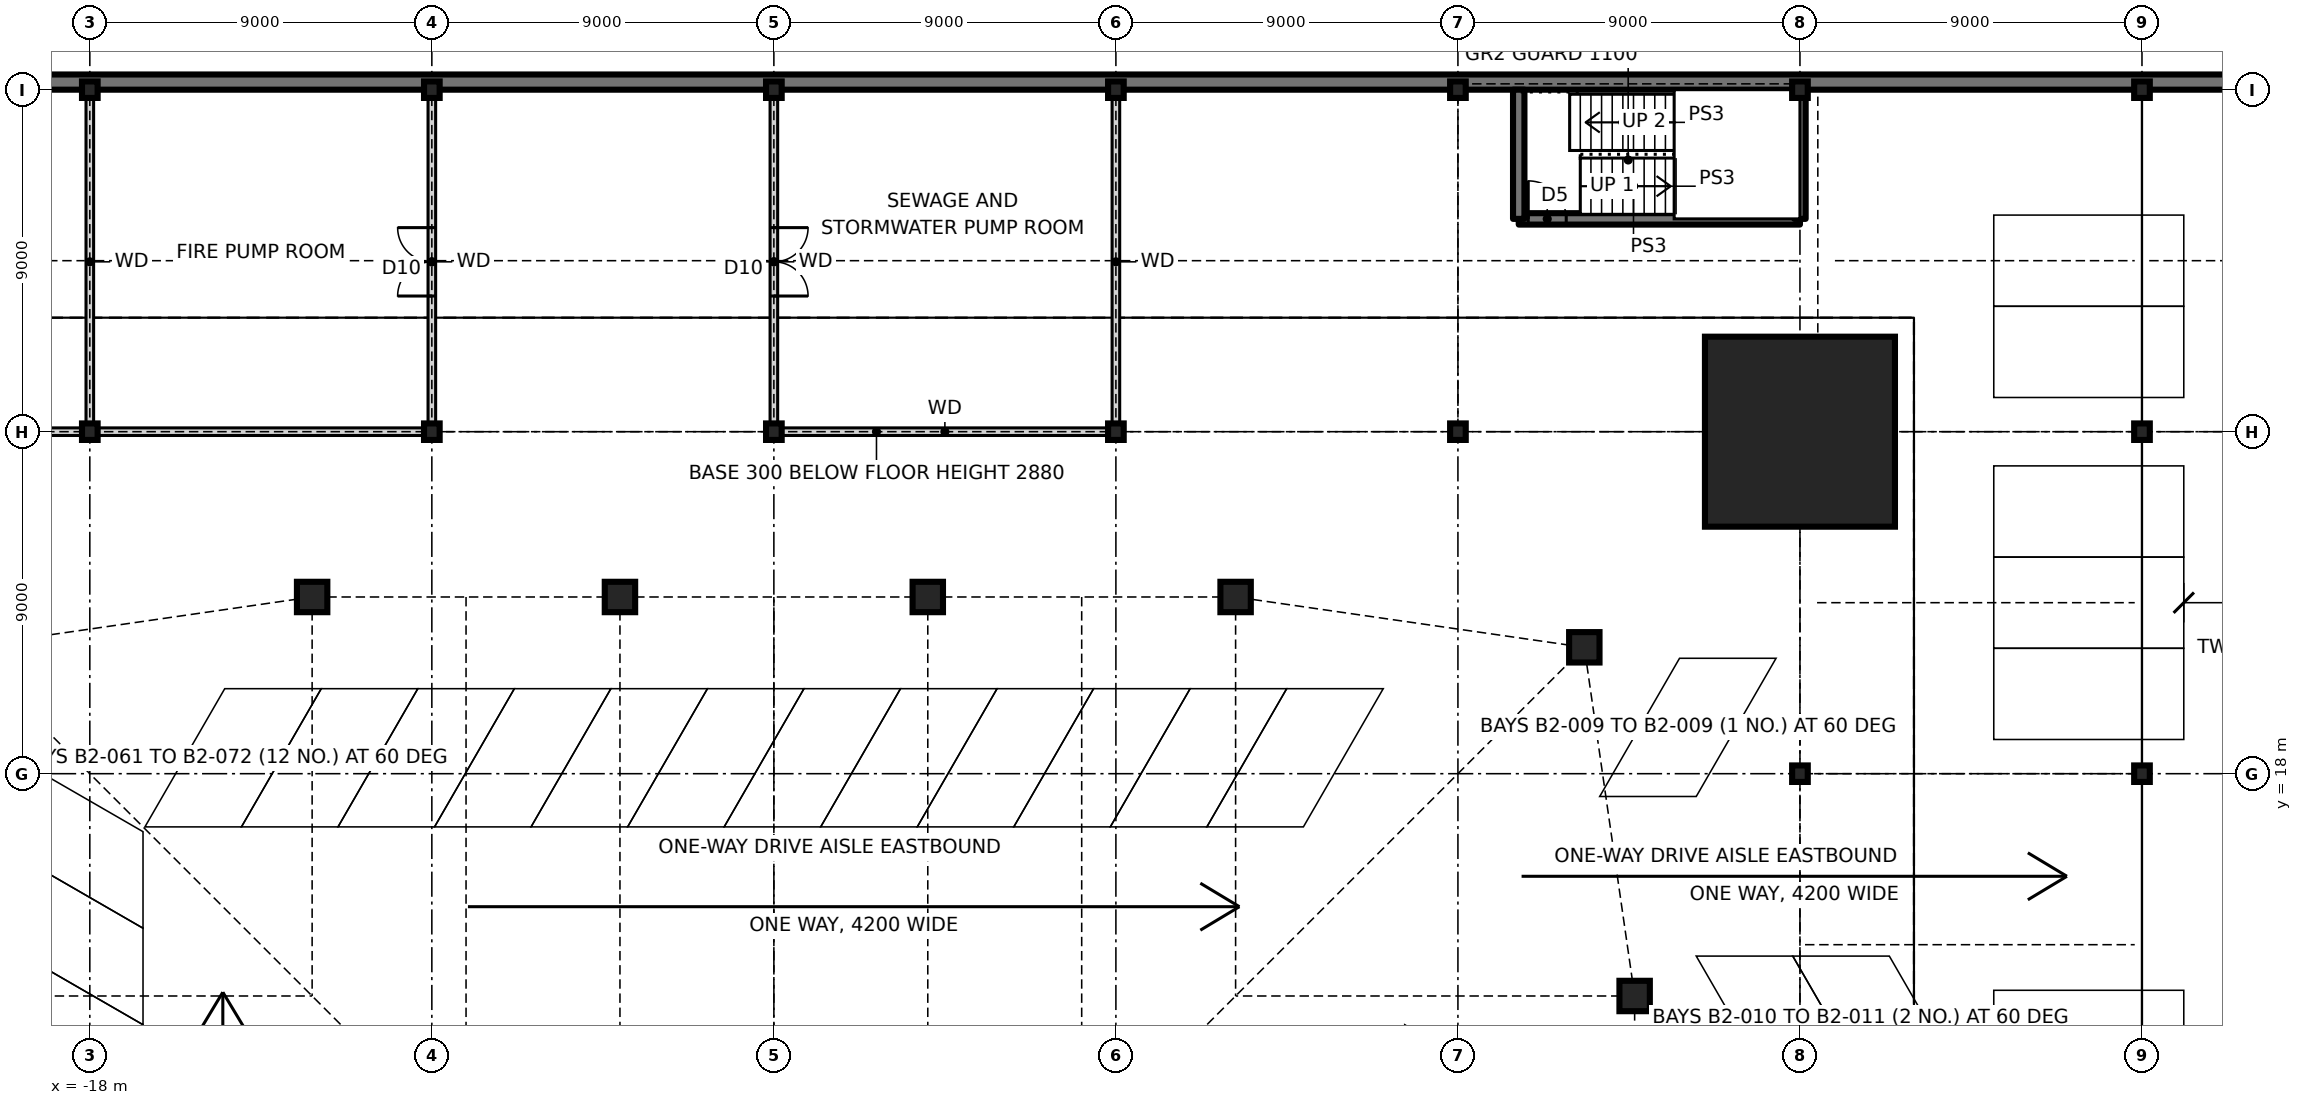
"""IFC4 building model, lengths in metres.
Left out: names, types, materials, properties, quantities, classifications, styles, units other than length and angle.
Written with IfcOpenShell. Run it as: python <this file> out.ifc"""

import sys

from ifc_helpers import new_model, si_unit, direction, frame, frame_2d, origin, origin_2d, place, context, subcontext, project, spatial, rectangle, hollow_rectangle, i_section, extrude, element, fill, save


model = new_model("IFC4")
c1 = context("Model", 3, precision=1e-05, world=origin(), true_north=direction((0.0, 1.0)))
c2 = subcontext(c1, "Body", "Model", "MODEL_VIEW")
j1 = project(units=[si_unit("LENGTHUNIT", "METRE"), si_unit("PLANEANGLEUNIT", "RADIAN")], contexts=[c1])
p1 = place(None, origin())
s1 = spatial("IfcSite", under=j1, at=p1, CompositionType="ELEMENT")
p2 = place(p1, origin())
s2 = spatial("IfcBuilding", under=s1, at=p2, CompositionType="ELEMENT")
p3 = place(p2, frame((0.0, 0.0, -7.2)))
s3 = spatial("IfcBuildingStorey", under=s2, at=p3, CompositionType="ELEMENT", Elevation=-7.2)
for number, where, z_axis, x_axis in (
    (1, (22.65, 12.15, -1.8), (0.0, 0.0, 1.0), (1.0, 0.0, 0.0)),
    (2, (21.326, 21.326, -1.8), (0.0, 0.0, 1.0), (1.0, 0.0, 0.0)),
    (3, (12.15, 22.65, -1.8), (0.0, 0.0, 1.0), (1.0, 0.0, 0.0)),
    (4, (4.05, 22.65, -1.8), (0.0, 0.0, 1.0), (1.0, 0.0, 0.0)),
    (5, (-4.05, 22.65, -1.8), (0.0, 0.0, 1.0), (1.0, 0.0, 0.0)),
    (6, (-12.15, 22.65, -1.8), (0.0, 0.0, 1.0), (1.0, 0.0, 0.0)),
):
    element("IfcColumn", number, at=place(p3, frame(where, z_axis=z_axis, x_axis=x_axis)), inside=s3, PredefinedType="COLUMN", context=c2, shape_type="SweptSolid", body=[
        extrude(hollow_rectangle(XDim=0.8, YDim=0.8, WallThickness=0.09, at=origin_2d()), origin(), (0.0, 0.0, 1.0), 5.4),
    ])
p4 = place(p3, frame((27.0, 27.0, -1.8), z_axis=(0.0, 0.0, 1.0), x_axis=(1.0, 0.0, 0.0)))
e7 = element("IfcColumn", 7, at=p4, inside=s3, PredefinedType="COLUMN", context=c2, shape_type="SweptSolid", body=[
    extrude(rectangle(XDim=5.0, YDim=5.0, at=origin_2d()), origin(), (0.0, 0.0, 1.0), 5.4),
    extrude(i_section(OverallWidth=0.478, OverallDepth=0.599, WebThickness=0.1, FlangeThickness=0.14, at=origin_2d()), origin(), (0.0, 0.0, 1.0), 5.4),
])
p5 = place(p3, frame((-18.0, 27.0, -1.8), z_axis=(0.0, 0.0, 1.0), x_axis=(1.0, 0.0, 0.0)))
e8 = element("IfcColumn", 8, at=p5, inside=s3, PredefinedType="COLUMN", context=c2, shape_type="SweptSolid", body=[
    extrude(i_section(OverallWidth=0.411, OverallDepth=0.434, WebThickness=0.036, FlangeThickness=0.057, at=origin_2d()), origin(), (0.0, 0.0, 1.0), 5.4),
])
p6 = place(p3, frame((-18.0, 36.0, -0.25), z_axis=(0.0, 0.0, 1.0), x_axis=(1.0, 0.0, 0.0)))
e9 = element("IfcColumn", 9, at=p6, inside=s3, PredefinedType="COLUMN", context=c2, shape_type="SweptSolid", body=[
    extrude(i_section(OverallWidth=0.411, OverallDepth=0.434, WebThickness=0.036, FlangeThickness=0.057, at=origin_2d()), origin(), (0.0, 0.0, 1.0), 3.85),
])
p7 = place(p3, frame((-9.0, 27.0, -1.8), z_axis=(0.0, 0.0, 1.0), x_axis=(1.0, 0.0, 0.0)))
e10 = element("IfcColumn", 10, at=p7, inside=s3, PredefinedType="COLUMN", context=c2, shape_type="SweptSolid", body=[
    extrude(i_section(OverallWidth=0.411, OverallDepth=0.434, WebThickness=0.036, FlangeThickness=0.057, at=origin_2d()), origin(), (0.0, 0.0, 1.0), 5.4),
])
p8 = place(p3, frame((-9.0, 36.0, -0.25), z_axis=(0.0, 0.0, 1.0), x_axis=(1.0, 0.0, 0.0)))
e11 = element("IfcColumn", 11, at=p8, inside=s3, PredefinedType="COLUMN", context=c2, shape_type="SweptSolid", body=[
    extrude(i_section(OverallWidth=0.411, OverallDepth=0.434, WebThickness=0.036, FlangeThickness=0.057, at=origin_2d()), origin(), (0.0, 0.0, 1.0), 3.85),
])
p9 = place(p3, frame((0.0, 27.0, -1.8), z_axis=(0.0, 0.0, 1.0), x_axis=(1.0, 0.0, 0.0)))
e12 = element("IfcColumn", 12, at=p9, inside=s3, PredefinedType="COLUMN", context=c2, shape_type="SweptSolid", body=[
    extrude(i_section(OverallWidth=0.411, OverallDepth=0.434, WebThickness=0.036, FlangeThickness=0.057, at=origin_2d()), origin(), (0.0, 0.0, 1.0), 5.4),
])
p10 = place(p3, frame((0.0, 36.0, -0.25), z_axis=(0.0, 0.0, 1.0), x_axis=(1.0, 0.0, 0.0)))
e13 = element("IfcColumn", 13, at=p10, inside=s3, PredefinedType="COLUMN", context=c2, shape_type="SweptSolid", body=[
    extrude(i_section(OverallWidth=0.411, OverallDepth=0.434, WebThickness=0.036, FlangeThickness=0.057, at=origin_2d()), origin(), (0.0, 0.0, 1.0), 3.85),
])
p11 = place(p3, frame((9.0, 27.0, -1.8), z_axis=(0.0, 0.0, 1.0), x_axis=(1.0, 0.0, 0.0)))
e14 = element("IfcColumn", 14, at=p11, inside=s3, PredefinedType="COLUMN", context=c2, shape_type="SweptSolid", body=[
    extrude(i_section(OverallWidth=0.411, OverallDepth=0.434, WebThickness=0.036, FlangeThickness=0.057, at=origin_2d()), origin(), (0.0, 0.0, 1.0), 5.4),
])
p12 = place(p3, frame((9.0, 36.0, -0.25), z_axis=(0.0, 0.0, 1.0), x_axis=(1.0, 0.0, 0.0)))
e15 = element("IfcColumn", 15, at=p12, inside=s3, PredefinedType="COLUMN", context=c2, shape_type="SweptSolid", body=[
    extrude(i_section(OverallWidth=0.411, OverallDepth=0.434, WebThickness=0.036, FlangeThickness=0.057, at=origin_2d()), origin(), (0.0, 0.0, 1.0), 3.85),
])
p13 = place(p3, frame((18.0, 27.0, -1.8), z_axis=(0.0, 0.0, 1.0), x_axis=(1.0, 0.0, 0.0)))
e16 = element("IfcColumn", 16, at=p13, inside=s3, PredefinedType="COLUMN", context=c2, shape_type="SweptSolid", body=[
    extrude(i_section(OverallWidth=0.411, OverallDepth=0.434, WebThickness=0.036, FlangeThickness=0.057, at=origin_2d()), origin(), (0.0, 0.0, 1.0), 5.4),
])
p14 = place(p3, frame((18.0, 36.0, -0.25), z_axis=(0.0, 0.0, 1.0), x_axis=(1.0, 0.0, 0.0)))
e17 = element("IfcColumn", 17, at=p14, inside=s3, PredefinedType="COLUMN", context=c2, shape_type="SweptSolid", body=[
    extrude(i_section(OverallWidth=0.411, OverallDepth=0.434, WebThickness=0.036, FlangeThickness=0.057, at=origin_2d()), origin(), (0.0, 0.0, 1.0), 3.85),
])
p15 = place(p3, frame((27.0, 18.0, -1.8), z_axis=(0.0, 0.0, 1.0), x_axis=(1.0, 0.0, 0.0)))
e18 = element("IfcColumn", 18, at=p15, inside=s3, PredefinedType="COLUMN", context=c2, shape_type="SweptSolid", body=[
    extrude(i_section(OverallWidth=0.411, OverallDepth=0.434, WebThickness=0.036, FlangeThickness=0.057, at=origin_2d()), origin(), (0.0, 0.0, 1.0), 5.4),
])
for number, where, z_axis, x_axis in (
    (19, (27.0, 36.0, -0.25), (0.0, 0.0, 1.0), (1.0, 0.0, 0.0)),
    (20, (36.0, 18.0, -0.25), (0.0, 0.0, 1.0), (1.0, 0.0, 0.0)),
    (21, (36.0, 27.0, -0.25), (0.0, 0.0, 1.0), (1.0, 0.0, 0.0)),
    (22, (36.0, 36.0, -0.25), (0.0, 0.0, 1.0), (1.0, 0.0, 0.0)),
):
    element("IfcColumn", number, at=place(p3, frame(where, z_axis=z_axis, x_axis=x_axis)), inside=s3, PredefinedType="COLUMN", context=c2, shape_type="SweptSolid", body=[
        extrude(i_section(OverallWidth=0.411, OverallDepth=0.434, WebThickness=0.036, FlangeThickness=0.057, at=origin_2d()), origin(), (0.0, 0.0, 1.0), 3.85),
    ])
p16 = place(p3, frame((30.0, 29.775, -1.8), z_axis=(0.0, 0.0, 1.0), x_axis=(-1.0, 0.0, 0.0)))
e23 = element("IfcWall", 23, at=p16, inside=s3, PredefinedType="SOLIDWALL", context=c2, shape_type="SweptSolid", body=[
    extrude(rectangle(XDim=60.0, YDim=0.45, at=frame_2d((30.0, 0.0))), origin(), (0.0, 0.0, 1.0), 1.5),
])
for number, where, z_axis, x_axis in (
    (24, (29.775, -29.55, -1.8), (0.0, 0.0, 1.0), (0.0, 1.0, 0.0)),
    (25, (-29.55, 18.0, -1.8), (0.0, 0.0, 1.0), (1.0, 0.0, 0.0)),
):
    element("IfcWall", number, at=place(p3, frame(where, z_axis=z_axis, x_axis=x_axis)), inside=s3, PredefinedType="SOLIDWALL", context=c2, shape_type="SweptSolid", body=[
        extrude(rectangle(XDim=59.1, YDim=0.45, at=frame_2d((29.55, 0.0))), origin(), (0.0, 0.0, 1.0), 1.5),
    ])
p17 = place(p3, frame((-24.5, 27.0, -1.8), z_axis=(0.0, 0.0, 1.0), x_axis=(1.0, 0.0, 0.0)))
e26 = element("IfcWall", 26, at=p17, inside=s3, PredefinedType="SOLIDWALL", context=c2, shape_type="SweptSolid", body=[
    extrude(rectangle(XDim=49.0, YDim=0.45, at=frame_2d((24.5, 0.0))), origin(), (0.0, 0.0, 1.0), 1.5),
])
for number, where, z_axis, x_axis in (
    (27, (-18.0, 9.225, -1.8), (0.0, 0.0, 1.0), (0.0, 1.0, 0.0)),
    (28, (-18.0, 18.225, -1.8), (0.0, 0.0, 1.0), (0.0, 1.0, 0.0)),
):
    element("IfcWall", number, at=place(p3, frame(where, z_axis=z_axis, x_axis=x_axis)), inside=s3, PredefinedType="SOLIDWALL", context=c2, shape_type="SweptSolid", body=[
        extrude(rectangle(XDim=8.55, YDim=0.45, at=frame_2d((4.275, 0.0))), origin(), (0.0, 0.0, 1.0), 1.5),
    ])
p18 = place(p3, frame((-18.0, 27.225, -1.8), z_axis=(0.0, 0.0, 1.0), x_axis=(0.0, 1.0, 0.0)))
e29 = element("IfcWall", 29, at=p18, inside=s3, PredefinedType="SOLIDWALL", context=c2, shape_type="SweptSolid", body=[
    extrude(rectangle(XDim=2.325, YDim=0.45, at=frame_2d((1.163, 0.0))), origin(), (0.0, 0.0, 1.0), 1.5),
])
p19 = place(p3, frame((-9.0, 9.6, -1.8), z_axis=(0.0, 0.0, 1.0), x_axis=(0.0, 1.0, 0.0)))
e30 = element("IfcWall", 30, at=p19, inside=s3, PredefinedType="SOLIDWALL", context=c2, shape_type="SweptSolid", body=[
    extrude(rectangle(XDim=8.175, YDim=0.45, at=frame_2d((4.087, 0.0))), origin(), (0.0, 0.0, 1.0), 1.5),
])
p20 = place(p3, frame((-9.0, 18.225, -1.8), z_axis=(0.0, 0.0, 1.0), x_axis=(0.0, 1.0, 0.0)))
e31 = element("IfcWall", 31, at=p20, inside=s3, PredefinedType="SOLIDWALL", context=c2, shape_type="SweptSolid", body=[
    extrude(rectangle(XDim=8.55, YDim=0.45, at=frame_2d((4.275, 0.0))), origin(), (0.0, 0.0, 1.0), 1.5),
])
p21 = place(p3, frame((-9.0, 27.225, -1.8), z_axis=(0.0, 0.0, 1.0), x_axis=(0.0, 1.0, 0.0)))
e32 = element("IfcWall", 32, at=p21, inside=s3, PredefinedType="SOLIDWALL", context=c2, shape_type="SweptSolid", body=[
    extrude(rectangle(XDim=2.325, YDim=0.45, at=frame_2d((1.163, 0.0))), origin(), (0.0, 0.0, 1.0), 1.5),
])
p22 = place(p3, frame((0.0, 9.6, -1.8), z_axis=(0.0, 0.0, 1.0), x_axis=(0.0, 1.0, 0.0)))
e33 = element("IfcWall", 33, at=p22, inside=s3, PredefinedType="SOLIDWALL", context=c2, shape_type="SweptSolid", body=[
    extrude(rectangle(XDim=8.175, YDim=0.45, at=frame_2d((4.087, 0.0))), origin(), (0.0, 0.0, 1.0), 1.5),
])
p23 = place(p3, frame((0.0, 18.225, -1.8), z_axis=(0.0, 0.0, 1.0), x_axis=(0.0, 1.0, 0.0)))
e34 = element("IfcWall", 34, at=p23, inside=s3, PredefinedType="SOLIDWALL", context=c2, shape_type="SweptSolid", body=[
    extrude(rectangle(XDim=8.55, YDim=0.45, at=frame_2d((4.275, 0.0))), origin(), (0.0, 0.0, 1.0), 1.5),
])
p24 = place(p3, frame((0.0, 27.225, -1.8), z_axis=(0.0, 0.0, 1.0), x_axis=(0.0, 1.0, 0.0)))
e35 = element("IfcWall", 35, at=p24, inside=s3, PredefinedType="SOLIDWALL", context=c2, shape_type="SweptSolid", body=[
    extrude(rectangle(XDim=2.325, YDim=0.45, at=frame_2d((1.163, 0.0))), origin(), (0.0, 0.0, 1.0), 1.5),
])
p25 = place(p3, frame((9.0, 9.6, -1.8), z_axis=(0.0, 0.0, 1.0), x_axis=(0.0, 1.0, 0.0)))
e36 = element("IfcWall", 36, at=p25, inside=s3, PredefinedType="SOLIDWALL", context=c2, shape_type="SweptSolid", body=[
    extrude(rectangle(XDim=8.175, YDim=0.45, at=frame_2d((4.087, 0.0))), origin(), (0.0, 0.0, 1.0), 1.5),
])
p26 = place(p3, frame((9.0, 18.225, -1.8), z_axis=(0.0, 0.0, 1.0), x_axis=(0.0, 1.0, 0.0)))
e37 = element("IfcWall", 37, at=p26, inside=s3, PredefinedType="SOLIDWALL", context=c2, shape_type="SweptSolid", body=[
    extrude(rectangle(XDim=8.55, YDim=0.45, at=frame_2d((4.275, 0.0))), origin(), (0.0, 0.0, 1.0), 1.5),
])
p27 = place(p3, frame((9.0, 27.225, -1.8), z_axis=(0.0, 0.0, 1.0), x_axis=(0.0, 1.0, 0.0)))
e38 = element("IfcWall", 38, at=p27, inside=s3, PredefinedType="SOLIDWALL", context=c2, shape_type="SweptSolid", body=[
    extrude(rectangle(XDim=2.325, YDim=0.45, at=frame_2d((1.163, 0.0))), origin(), (0.0, 0.0, 1.0), 1.5),
])
for number, where, z_axis, x_axis in (
    (39, (18.0, 9.225, -1.8), (0.0, 0.0, 1.0), (0.0, 1.0, 0.0)),
    (40, (18.0, 18.225, -1.8), (0.0, 0.0, 1.0), (0.0, 1.0, 0.0)),
):
    element("IfcWall", number, at=place(p3, frame(where, z_axis=z_axis, x_axis=x_axis)), inside=s3, PredefinedType="SOLIDWALL", context=c2, shape_type="SweptSolid", body=[
        extrude(rectangle(XDim=8.55, YDim=0.45, at=frame_2d((4.275, 0.0))), origin(), (0.0, 0.0, 1.0), 1.5),
    ])
p28 = place(p3, frame((18.0, 27.225, -1.8), z_axis=(0.0, 0.0, 1.0), x_axis=(0.0, 1.0, 0.0)))
e41 = element("IfcWall", 41, at=p28, inside=s3, PredefinedType="SOLIDWALL", context=c2, shape_type="SweptSolid", body=[
    extrude(rectangle(XDim=2.325, YDim=0.45, at=frame_2d((1.163, 0.0))), origin(), (0.0, 0.0, 1.0), 1.5),
])
p29 = place(p3, frame((27.0, 9.225, -1.8), z_axis=(0.0, 0.0, 1.0), x_axis=(0.0, 1.0, 0.0)))
e42 = element("IfcWall", 42, at=p29, inside=s3, PredefinedType="SOLIDWALL", context=c2, shape_type="SweptSolid", body=[
    extrude(rectangle(XDim=8.55, YDim=0.45, at=frame_2d((4.275, 0.0))), origin(), (0.0, 0.0, 1.0), 1.5),
])
p30 = place(p3, frame((27.0, 18.225, -1.8), z_axis=(0.0, 0.0, 1.0), x_axis=(0.0, 1.0, 0.0)))
e43 = element("IfcWall", 43, at=p30, inside=s3, PredefinedType="SOLIDWALL", context=c2, shape_type="SweptSolid", body=[
    extrude(rectangle(XDim=6.275, YDim=0.45, at=frame_2d((3.137, 0.0))), origin(), (0.0, 0.0, 1.0), 1.5),
])
p31 = place(p3, frame((90.2, 36.2, 0.0), z_axis=(0.0, 0.0, 1.0), x_axis=(-1.0, 0.0, 0.0)))
e44 = element("IfcWall", 44, at=p31, inside=s3, PredefinedType="SOLIDWALL", context=c2, shape_type="SweptSolid", body=[
    extrude(rectangle(XDim=126.4, YDim=0.4, at=frame_2d((63.2, 0.0))), origin(), (0.0, 0.0, 1.0), 3.6),
])
p32 = place(p3, frame((-35.94, 27.0, -0.25), z_axis=(0.0, 0.0, 1.0), x_axis=(1.0, 0.0, 0.0)))
e45 = element("IfcWall", 45, at=p32, inside=s3, PredefinedType="SOLIDWALL", context=c2, shape_type="SweptSolid", body=[
    extrude(rectangle(XDim=26.94, YDim=0.2, at=frame_2d((13.47, 0.0))), origin(), (0.0, 0.0, 1.0), 2.7),
])
p33 = place(p32, frame((11.62, 0.0, 0.25)))
e46 = element("IfcOpeningElement", 46, at=p33, cuts=e45, PredefinedType="OPENING", context=c2, shape_type="SweptSolid", body=[
    extrude(rectangle(XDim=1.8, YDim=2.4, at=frame_2d((0.9, 1.2))), frame((0.0, 0.11, 0.0), z_axis=(0.0, -1.0, 0.0), x_axis=(1.0, 0.0, 0.0)), (0.0, 0.0, 1.0), 0.22),
])
p34 = place(p3, frame((0.0, 27.0, -0.3), z_axis=(0.0, 0.0, 1.0), x_axis=(1.0, 0.0, 0.0)))
e47 = element("IfcWall", 47, at=p34, inside=s3, PredefinedType="SOLIDWALL", context=c2, shape_type="SweptSolid", body=[
    extrude(rectangle(XDim=9.0, YDim=0.2, at=frame_2d((4.5, 0.0))), origin(), (0.0, 0.0, 1.0), 2.88),
])
p35 = place(p3, frame((19.6, 32.6, -0.25), z_axis=(0.0, 0.0, 1.0), x_axis=(1.0, 0.0, 0.0)))
e48 = element("IfcWall", 48, at=p35, inside=s3, PredefinedType="SOLIDWALL", context=c2, shape_type="SweptSolid", body=[
    extrude(rectangle(XDim=7.4, YDim=0.3, at=frame_2d((3.7, 0.0))), origin(), (0.0, 0.0, 1.0), 3.85),
])
p36 = place(p35, frame((0.25, 0.0, 0.25)))
e49 = element("IfcOpeningElement", 49, at=p36, cuts=e48, PredefinedType="OPENING", context=c2, shape_type="SweptSolid", body=[
    extrude(rectangle(XDim=1.0, YDim=2.1, at=frame_2d((0.5, 1.05))), frame((0.0, 0.16, 0.0), z_axis=(0.0, -1.0, 0.0), x_axis=(1.0, 0.0, 0.0)), (0.0, 0.0, 1.0), 0.32),
])
p37 = place(p3, frame((27.0, 32.6, -0.25), z_axis=(0.0, 0.0, 1.0), x_axis=(0.0, 1.0, 0.0)))
e50 = element("IfcWall", 50, at=p37, inside=s3, PredefinedType="SOLIDWALL", context=c2, shape_type="SweptSolid", body=[
    extrude(rectangle(XDim=3.183, YDim=0.3, at=frame_2d((1.591, 0.0))), origin(), (0.0, 0.0, 1.0), 3.85),
])
p38 = place(p3, frame((19.6, 32.6, -0.25), z_axis=(0.0, 0.0, 1.0), x_axis=(0.0, 1.0, 0.0)))
e51 = element("IfcWall", 51, at=p38, inside=s3, PredefinedType="SOLIDWALL", context=c2, shape_type="SweptSolid", body=[
    extrude(rectangle(XDim=3.4, YDim=0.3, at=frame_2d((1.7, 0.0))), origin(), (0.0, 0.0, 1.0), 3.85),
])
p39 = place(p3, frame((9.0, 27.0, -0.25), z_axis=(0.0, 0.0, 1.0), x_axis=(0.0, 1.0, 0.0)))
e52 = element("IfcWall", 52, at=p39, inside=s3, PredefinedType="SOLIDWALL", context=c2, shape_type="SweptSolid", body=[
    extrude(rectangle(XDim=8.94, YDim=0.2, at=frame_2d((4.47, 0.0))), origin(), (0.0, 0.0, 1.0), 2.83),
])
p40 = place(p3, frame((0.0, 27.0, -0.25), z_axis=(0.0, 0.0, 1.0), x_axis=(0.0, 1.0, 0.0)))
e53 = element("IfcWall", 53, at=p40, inside=s3, PredefinedType="SOLIDWALL", context=c2, shape_type="SweptSolid", body=[
    extrude(rectangle(XDim=8.94, YDim=0.2, at=frame_2d((4.47, 0.0))), origin(), (0.0, 0.0, 1.0), 2.83),
])
p41 = place(p40, frame((3.57, 0.0, 0.25)))
e54 = element("IfcOpeningElement", 54, at=p41, cuts=e53, PredefinedType="OPENING", context=c2, shape_type="SweptSolid", body=[
    extrude(rectangle(XDim=1.8, YDim=2.4, at=frame_2d((0.9, 1.2))), frame((0.0, 0.11, 0.0), z_axis=(0.0, -1.0, 0.0), x_axis=(1.0, 0.0, 0.0)), (0.0, 0.0, 1.0), 0.22),
])
p42 = place(p3, frame((-9.0, 27.0, -0.25), z_axis=(0.0, 0.0, 1.0), x_axis=(0.0, 1.0, 0.0)))
e55 = element("IfcWall", 55, at=p42, inside=s3, PredefinedType="SOLIDWALL", context=c2, shape_type="SweptSolid", body=[
    extrude(rectangle(XDim=8.94, YDim=0.2, at=frame_2d((4.47, 0.0))), origin(), (0.0, 0.0, 1.0), 2.83),
])
p43 = place(p42, frame((3.57, 0.0, 0.25)))
e56 = element("IfcOpeningElement", 56, at=p43, cuts=e55, PredefinedType="OPENING", context=c2, shape_type="SweptSolid", body=[
    extrude(rectangle(XDim=1.8, YDim=2.4, at=frame_2d((0.9, 1.2))), frame((0.0, 0.11, 0.0), z_axis=(0.0, -1.0, 0.0), x_axis=(1.0, 0.0, 0.0)), (0.0, 0.0, 1.0), 0.22),
])
p44 = place(p3, frame((-18.0, 27.0, -0.25), z_axis=(0.0, 0.0, 1.0), x_axis=(0.0, 1.0, 0.0)))
e57 = element("IfcWall", 57, at=p44, inside=s3, PredefinedType="SOLIDWALL", context=c2, shape_type="SweptSolid", body=[
    extrude(rectangle(XDim=8.94, YDim=0.2, at=frame_2d((4.47, 0.0))), origin(), (0.0, 0.0, 1.0), 2.83),
])
p45 = place(p43, origin())
e58 = element("IfcDoor", 58, at=p45, inside=s3, OperationType="DOUBLE_DOOR_SINGLE_SWING", PredefinedType="DOOR", context=c2, shape_type="SweptSolid", body=[
    extrude(rectangle(XDim=1.8, YDim=2.4, at=frame_2d((0.9, 1.2))), frame((0.0, 0.025, 0.0), z_axis=(0.0, -1.0, 0.0), x_axis=(1.0, 0.0, 0.0)), (0.0, 0.0, 1.0), 0.05),
])
fill(e56, e58)
p46 = place(p41, frame((1.8, 0.0, 0.0), z_axis=(0.0, 0.0, 1.0), x_axis=(-1.0, 0.0, 0.0)))
e59 = element("IfcDoor", 59, at=p46, inside=s3, OperationType="DOUBLE_DOOR_SINGLE_SWING", PredefinedType="DOOR", context=c2, shape_type="SweptSolid", body=[
    extrude(rectangle(XDim=1.8, YDim=2.4, at=frame_2d((0.9, 1.2))), frame((0.0, 0.025, 0.0), z_axis=(0.0, -1.0, 0.0), x_axis=(1.0, 0.0, 0.0)), (0.0, 0.0, 1.0), 0.05),
])
fill(e54, e59)
p47 = place(p36, origin())
e60 = element("IfcDoor", 60, at=p47, inside=s3, OperationType="SINGLE_SWING_LEFT", PredefinedType="DOOR", context=c2, shape_type="SweptSolid", body=[
    extrude(rectangle(XDim=1.0, YDim=2.1, at=frame_2d((0.5, 1.05))), frame((0.0, 0.025, 0.0), z_axis=(0.0, -1.0, 0.0), x_axis=(1.0, 0.0, 0.0)), (0.0, 0.0, 1.0), 0.05),
])
fill(e49, e60)
save(model, sys.argv[1])
